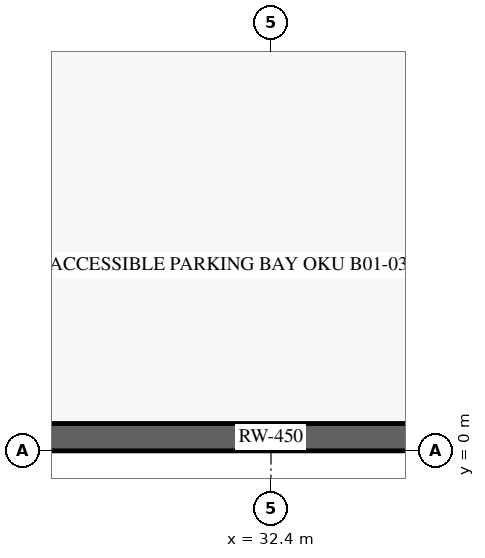
"""IFC4 building model, lengths in metres.
Left out: names, types, materials, properties, quantities, classifications, styles, units other than length and angle.
Written with IfcOpenShell. Run it as: python <this file> out.ifc"""

import sys

from ifc_helpers import new_model, si_unit, direction, frame, frame_2d, origin, place, context, subcontext, project, spatial, rectangle, extrude, element, save


model = new_model("IFC4")
c1 = context("Model", 3, precision=1e-05, world=origin(), true_north=direction((0.0, 1.0)))
c2 = subcontext(c1, "Body", "Model", "MODEL_VIEW")
j1 = project(units=[si_unit("LENGTHUNIT", "METRE"), si_unit("PLANEANGLEUNIT", "RADIAN")], contexts=[c1])
p1 = place(None, origin())
s1 = spatial("IfcSite", under=j1, at=p1, CompositionType="ELEMENT")
p2 = place(p1, origin())
s2 = spatial("IfcBuilding", under=s1, at=p2, CompositionType="ELEMENT")
p3 = place(p2, frame((0.0, 0.0, -3.6)))
s3 = spatial("IfcBuildingStorey", under=s2, at=p3, CompositionType="ELEMENT", Elevation=-3.6)
p4 = place(p3, frame((0.225, 0.225, -0.36), z_axis=(0.0, 0.0, 1.0), x_axis=(1.0, 0.0, 0.0)))
e1 = element("IfcWall", 1, at=p4, inside=s3, PredefinedType="USERDEFINED", context=c2, shape_type="SweptSolid", body=[
    extrude(rectangle(XDim=64.35, YDim=0.45, at=frame_2d((32.175, 0.0))), origin(), (0.0, 0.0, 1.0), 3.578),
])
save(model, sys.argv[1])
